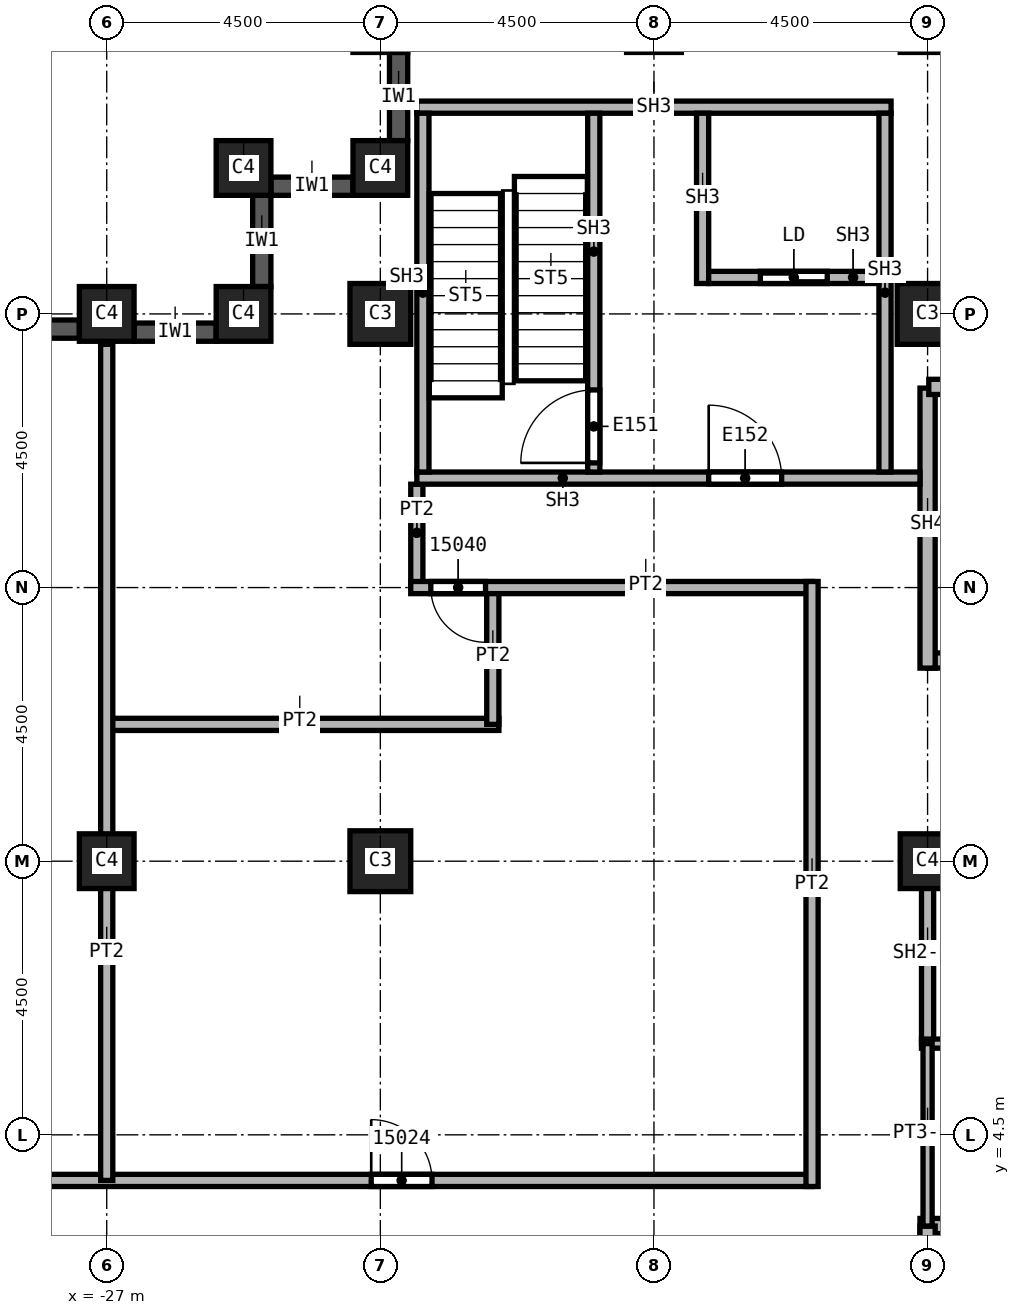
"""IFC4 building model, lengths in metres.
Left out: names, types, materials, properties, quantities, classifications, styles, units other than length and angle.
Written with IfcOpenShell. Run it as: python <this file> out.ifc"""

import sys

from ifc_helpers import new_model, si_unit, direction, frame, frame_2d, origin, origin_2d, place, context, subcontext, project, spatial, rectangle, extrude, element, fill, save


model = new_model("IFC4")
c1 = context("Model", 3, precision=1e-05, world=origin(), true_north=direction((0.0, 1.0)))
c2 = subcontext(c1, "Body", "Model", "MODEL_VIEW")
j1 = project(units=[si_unit("LENGTHUNIT", "METRE"), si_unit("PLANEANGLEUNIT", "RADIAN")], contexts=[c1])
p1 = place(None, origin())
s1 = spatial("IfcSite", under=j1, at=p1, CompositionType="ELEMENT")
p2 = place(p1, origin())
s2 = spatial("IfcBuilding", under=s1, at=p2, CompositionType="ELEMENT")
p3 = place(p2, frame((0.0, 0.0, 232.0)))
s3 = spatial("IfcBuildingStorey", under=s2, at=p3, CompositionType="ELEMENT", Elevation=232.0)
for number, where, z_axis, x_axis in (
    (1, (-13.5, 18.0, 0.0), (0.0, 0.0, 1.0), (1.0, 0.0, 0.0)),
    (2, (-22.5, 9.0, 0.0), (0.0, 0.0, 1.0), (1.0, 0.0, 0.0)),
    (3, (-22.5, 18.0, 0.0), (0.0, 0.0, 1.0), (1.0, 0.0, 0.0)),
):
    element("IfcColumn", number, at=place(p3, frame(where, z_axis=z_axis, x_axis=x_axis)), inside=s3, PredefinedType="COLUMN", context=c2, shape_type="SweptSolid", body=[
        extrude(rectangle(XDim=1.0, YDim=1.0, at=origin_2d()), origin(), (0.0, 0.0, 1.0), 3.6),
    ])
for number, where, z_axis, x_axis in (
    (4, (-13.5, 9.0, 0.0), (0.0, 0.0, 1.0), (1.0, 0.0, 0.0)),
    (5, (-27.0, 9.0, 0.0), (0.0, 0.0, 1.0), (1.0, 0.0, 0.0)),
    (6, (-27.0, 18.0, 0.0), (0.0, 0.0, 1.0), (1.0, 0.0, 0.0)),
    (7, (-22.5, 20.4, 0.0), (0.0, 0.0, 1.0), (1.0, 0.0, 0.0)),
    (8, (-24.75, 20.4, 0.0), (0.0, 0.0, 1.0), (1.0, 0.0, 0.0)),
    (9, (-24.75, 18.0, 0.0), (0.0, 0.0, 1.0), (1.0, 0.0, 0.0)),
):
    element("IfcColumn", number, at=place(p3, frame(where, z_axis=z_axis, x_axis=x_axis)), inside=s3, PredefinedType="COLUMN", context=c2, shape_type="SweptSolid", body=[
        extrude(rectangle(XDim=0.9, YDim=0.9, at=origin_2d()), origin(), (0.0, 0.0, 1.0), 3.6),
    ])
p4 = place(p3, frame((-22.95, 20.1, 0.0), z_axis=(0.0, 0.0, 1.0), x_axis=(-1.0, 0.0, 0.0)))
e10 = element("IfcWall", 10, at=p4, inside=s3, PredefinedType="SOLIDWALL", context=c2, shape_type="SweptSolid", body=[
    extrude(rectangle(XDim=1.35, YDim=0.3, at=frame_2d((0.675, 0.0))), origin(), (0.0, 0.0, 1.0), 3.0),
])
p5 = place(p3, frame((-24.45, 19.95, 0.0), z_axis=(0.0, 0.0, 1.0), x_axis=(0.0, -1.0, 0.0)))
e11 = element("IfcWall", 11, at=p5, inside=s3, PredefinedType="SOLIDWALL", context=c2, shape_type="SweptSolid", body=[
    extrude(rectangle(XDim=1.5, YDim=0.3, at=frame_2d((0.75, 0.0))), origin(), (0.0, 0.0, 1.0), 3.0),
])
p6 = place(p3, frame((-25.2, 17.7, 0.0), z_axis=(0.0, 0.0, 1.0), x_axis=(-1.0, 0.0, 0.0)))
e12 = element("IfcWall", 12, at=p6, inside=s3, PredefinedType="SOLIDWALL", context=c2, shape_type="SweptSolid", body=[
    extrude(rectangle(XDim=1.35, YDim=0.3, at=frame_2d((0.675, 0.0))), origin(), (0.0, 0.0, 1.0), 3.0),
])
p7 = place(p3, frame((-27.45, 17.75, 0.0), z_axis=(0.0, 0.0, 1.0), x_axis=(-1.0, 0.0, 0.0)))
e13 = element("IfcWall", 13, at=p7, inside=s3, PredefinedType="SOLIDWALL", context=c2, shape_type="SweptSolid", body=[
    extrude(rectangle(XDim=3.6, YDim=0.3, at=frame_2d((1.8, 0.0))), origin(), (0.0, 0.0, 1.0), 3.0),
])
p8 = place(p7, frame((0.6, 0.0, 0.8)))
e14 = element("IfcOpeningElement", 14, at=p8, cuts=e13, PredefinedType="OPENING", context=c2, shape_type="SweptSolid", body=[
    extrude(rectangle(XDim=2.4, YDim=1.95, at=frame_2d((1.2, 0.975))), frame((0.0, 0.15, 0.0), z_axis=(0.0, -1.0, 0.0), x_axis=(1.0, 0.0, 0.0)), (0.0, 0.0, 1.0), 0.3),
])
p9 = place(p3, frame((-22.2, 22.3, 0.0), z_axis=(0.0, 0.0, 1.0), x_axis=(0.0, -1.0, 0.0)))
e15 = element("IfcWall", 15, at=p9, inside=s3, PredefinedType="SOLIDWALL", context=c2, shape_type="SweptSolid", body=[
    extrude(rectangle(XDim=1.45, YDim=0.3, at=frame_2d((0.725, 0.0))), origin(), (0.0, 0.0, 1.0), 3.0),
])
p10 = place(p3, frame((-33.85, 3.75, 0.0), z_axis=(0.0, 0.0, 1.0), x_axis=(1.0, 0.0, 0.0)))
e16 = element("IfcWall", 16, at=p10, inside=s3, PredefinedType="PARTITIONING", context=c2, shape_type="SweptSolid", body=[
    extrude(rectangle(XDim=18.45, YDim=0.2, at=frame_2d((9.225, 0.0))), origin(), (0.0, 0.0, 1.0), 3.6),
])
p11 = place(p10, frame((11.2, 0.0, 0.0)))
e17 = element("IfcOpeningElement", 17, at=p11, cuts=e16, PredefinedType="OPENING", context=c2, shape_type="SweptSolid", body=[
    extrude(rectangle(XDim=1.0, YDim=2.1, at=frame_2d((0.5, 1.05))), frame((0.0, 0.1, 0.0), z_axis=(0.0, -1.0, 0.0), x_axis=(1.0, 0.0, 0.0)), (0.0, 0.0, 1.0), 0.2),
])
p12 = place(p3, frame((-27.1, 11.25, 0.0), z_axis=(0.0, 0.0, 1.0), x_axis=(1.0, 0.0, 0.0)))
e18 = element("IfcWall", 18, at=p12, inside=s3, PredefinedType="PARTITIONING", context=c2, shape_type="SweptSolid", body=[
    extrude(rectangle(XDim=6.55, YDim=0.2, at=frame_2d((3.275, 0.0))), origin(), (0.0, 0.0, 1.0), 3.6),
])
p13 = place(p3, frame((-27.0, 3.75, 0.0), z_axis=(0.0, 0.0, 1.0), x_axis=(0.0, 1.0, 0.0)))
e19 = element("IfcWall", 19, at=p13, inside=s3, PredefinedType="PARTITIONING", context=c2, shape_type="SweptSolid", body=[
    extrude(rectangle(XDim=13.75, YDim=0.2, at=frame_2d((6.875, 0.0))), origin(), (0.0, 0.0, 1.0), 3.6),
])
p14 = place(p3, frame((-21.9, 13.5, 0.0), z_axis=(0.0, 0.0, 1.0), x_axis=(0.0, 1.0, 0.0)))
e20 = element("IfcWall", 20, at=p14, inside=s3, PredefinedType="PARTITIONING", context=c2, shape_type="SweptSolid", body=[
    extrude(rectangle(XDim=1.7, YDim=0.2, at=frame_2d((0.85, 0.0))), origin(), (0.0, 0.0, 1.0), 3.6),
])
p15 = place(p3, frame((-20.65, 11.25, 0.0), z_axis=(0.0, 0.0, 1.0), x_axis=(0.0, 1.0, 0.0)))
e21 = element("IfcWall", 21, at=p15, inside=s3, PredefinedType="PARTITIONING", context=c2, shape_type="SweptSolid", body=[
    extrude(rectangle(XDim=2.25, YDim=0.2, at=frame_2d((1.125, 0.0))), origin(), (0.0, 0.0, 1.0), 3.6),
])
p16 = place(p3, frame((-15.4, 13.5, 0.0), z_axis=(0.0, 0.0, 1.0), x_axis=(-1.0, 0.0, 0.0)))
e22 = element("IfcWall", 22, at=p16, inside=s3, PredefinedType="PARTITIONING", context=c2, shape_type="SweptSolid", body=[
    extrude(rectangle(XDim=6.6, YDim=0.2, at=frame_2d((3.3, 0.0))), origin(), (0.0, 0.0, 1.0), 3.6),
])
p17 = place(p16, frame((5.37, 0.0, 0.0)))
e23 = element("IfcOpeningElement", 23, at=p17, cuts=e22, PredefinedType="OPENING", context=c2, shape_type="SweptSolid", body=[
    extrude(rectangle(XDim=0.9, YDim=2.1, at=frame_2d((0.45, 1.05))), frame((0.0, 0.1, 0.0), z_axis=(0.0, -1.0, 0.0), x_axis=(1.0, 0.0, 0.0)), (0.0, 0.0, 1.0), 0.2),
])
p18 = place(p3, frame((-15.4, 3.65, 0.0), z_axis=(0.0, 0.0, 1.0), x_axis=(0.0, 1.0, 0.0)))
e24 = element("IfcWall", 24, at=p18, inside=s3, PredefinedType="PARTITIONING", context=c2, shape_type="SweptSolid", body=[
    extrude(rectangle(XDim=9.95, YDim=0.2, at=frame_2d((4.975, 0.0))), origin(), (0.0, 0.0, 1.0), 3.6),
])
p19 = place(p3, frame((-13.5, 6.0, 0.0), z_axis=(0.0, 0.0, 1.0), x_axis=(0.0, 1.0, 0.0)))
e25 = element("IfcWall", 25, at=p19, inside=s3, PredefinedType="SOLIDWALL", context=c2, shape_type="SweptSolid", body=[
    extrude(rectangle(XDim=3.1, YDim=0.2, at=frame_2d((1.55, 0.0))), origin(), (0.0, 0.0, 1.0), 2.838),
])
p20 = place(p3, frame((-13.5, 9.0, 0.0), z_axis=(0.0, 0.0, 1.0), x_axis=(1.0, 0.0, 0.0)))
e26 = element("IfcWall", 26, at=p20, inside=s3, PredefinedType="SOLIDWALL", context=c2, shape_type="SweptSolid", body=[
    extrude(rectangle(XDim=3.0, YDim=0.2, at=frame_2d((1.5, 0.0))), origin(), (0.0, 0.0, 1.0), 2.838),
])
p21 = place(p3, frame((-13.625, 3.0, 0.0), z_axis=(0.0, 0.0, 1.0), x_axis=(1.0, 0.0, 0.0)))
e27 = element("IfcWall", 27, at=p21, inside=s3, PredefinedType="SOLIDWALL", context=c2, shape_type="SweptSolid", body=[
    extrude(rectangle(XDim=9.25, YDim=0.25, at=frame_2d((4.625, 0.0))), origin(), (0.0, 0.0, 1.0), 3.6),
])
p22 = place(p21, frame((3.25, 0.0, 0.0)))
e28 = element("IfcOpeningElement", 28, at=p22, cuts=e27, PredefinedType="OPENING", context=c2, shape_type="SweptSolid", body=[
    extrude(rectangle(XDim=1.1, YDim=2.1, at=frame_2d((0.55, 1.05))), frame((0.0, 0.125, 0.0), z_axis=(0.0, -1.0, 0.0), x_axis=(1.0, 0.0, 0.0)), (0.0, 0.0, 1.0), 0.25),
])
p23 = place(p3, frame((-13.5, -3.0, 0.0), z_axis=(0.0, 0.0, 1.0), x_axis=(0.0, 1.0, 0.0)))
e29 = element("IfcWall", 29, at=p23, inside=s3, PredefinedType="SOLIDWALL", context=c2, shape_type="SweptSolid", body=[
    extrude(rectangle(XDim=6.0, YDim=0.25, at=frame_2d((3.0, 0.0))), origin(), (0.0, 0.0, 1.0), 2.838),
])
p24 = place(p3, frame((-13.5, 12.3, 0.0), z_axis=(0.0, 0.0, 1.0), x_axis=(1.0, 0.0, 0.0)))
e30 = element("IfcWall", 30, at=p24, inside=s3, PredefinedType="SOLIDWALL", context=c2, shape_type="SweptSolid", body=[
    extrude(rectangle(XDim=9.125, YDim=0.25, at=frame_2d((4.562, 0.0))), origin(), (0.0, 0.0, 1.0), 3.6),
])
p25 = place(p24, frame((0.6, 0.0, 0.0)))
e31 = element("IfcOpeningElement", 31, at=p25, cuts=e30, PredefinedType="OPENING", context=c2, shape_type="SweptSolid", body=[
    extrude(rectangle(XDim=1.2, YDim=2.1, at=frame_2d((0.6, 1.05))), frame((0.0, 0.125, 0.0), z_axis=(0.0, -1.0, 0.0), x_axis=(1.0, 0.0, 0.0)), (0.0, 0.0, 1.0), 0.25),
])
p26 = place(p3, frame((-13.5, 16.78, 0.0), z_axis=(0.0, 0.0, 1.0), x_axis=(0.0, -1.0, 0.0)))
e32 = element("IfcWall", 32, at=p26, inside=s3, PredefinedType="SOLIDWALL", context=c2, shape_type="SweptSolid", body=[
    extrude(rectangle(XDim=4.605, YDim=0.25, at=frame_2d((2.302, 0.0))), origin(), (0.0, 0.0, 1.0), 3.6),
])
p27 = place(p3, frame((-13.48, 16.8, 0.0), z_axis=(0.0, 0.0, 1.0), x_axis=(1.0, 0.0, 0.0)))
e33 = element("IfcWall", 33, at=p27, inside=s3, PredefinedType="SOLIDWALL", context=c2, shape_type="SweptSolid", body=[
    extrude(rectangle(XDim=8.96, YDim=0.25, at=frame_2d((4.48, 0.0))), origin(), (0.0, 0.0, 1.0), 3.6),
])
p28 = place(p3, frame((-13.6, 6.0, 0.0), z_axis=(0.0, 0.0, 1.0), x_axis=(1.0, 0.0, 0.0)))
e34 = element("IfcWall", 34, at=p28, inside=s3, PredefinedType="PARTITIONING", context=c2, shape_type="SweptSolid", body=[
    extrude(rectangle(XDim=3.1, YDim=0.15, at=frame_2d((1.55, 0.0))), origin(), (0.0, 0.0, 1.0), 3.6),
])
p29 = place(p3, frame((-13.5, 3.0, 0.0), z_axis=(0.0, 0.0, 1.0), x_axis=(0.0, 1.0, 0.0)))
e35 = element("IfcWall", 35, at=p29, inside=s3, PredefinedType="PARTITIONING", context=c2, shape_type="SweptSolid", body=[
    extrude(rectangle(XDim=3.0, YDim=0.15, at=frame_2d((1.5, 0.0))), origin(), (0.0, 0.0, 1.0), 2.838),
])
p30 = place(p3, frame((-21.9, 15.3, 0.0), z_axis=(0.0, 0.0, 1.0), x_axis=(1.0, 0.0, 0.0)))
e36 = element("IfcWall", 36, at=p30, inside=s3, PredefinedType="SOLIDWALL", context=c2, shape_type="SweptSolid", body=[
    extrude(rectangle(XDim=8.275, YDim=0.2, at=frame_2d((4.137, 0.0))), origin(), (0.0, 0.0, 1.0), 3.6),
])
p31 = place(p30, frame((4.8, 0.0, 0.0)))
e37 = element("IfcOpeningElement", 37, at=p31, cuts=e36, PredefinedType="OPENING", context=c2, shape_type="SweptSolid", body=[
    extrude(rectangle(XDim=1.2, YDim=2.1, at=frame_2d((0.6, 1.05))), frame((0.0, 0.1, 0.0), z_axis=(0.0, -1.0, 0.0), x_axis=(1.0, 0.0, 0.0)), (0.0, 0.0, 1.0), 0.2),
])
p32 = place(p3, frame((-21.9, 21.4, 0.0), z_axis=(0.0, 0.0, 1.0), x_axis=(1.0, 0.0, 0.0)))
e38 = element("IfcWall", 38, at=p32, inside=s3, PredefinedType="SOLIDWALL", context=c2, shape_type="SweptSolid", body=[
    extrude(rectangle(XDim=7.8, YDim=0.2, at=frame_2d((3.9, 0.0))), origin(), (0.0, 0.0, 1.0), 3.6),
])
for number, where, z_axis, x_axis in (
    (39, (-21.8, 15.4, 0.0), (0.0, 0.0, 1.0), (0.0, 1.0, 0.0)),
    (40, (-14.2, 15.4, 0.0), (0.0, 0.0, 1.0), (0.0, 1.0, 0.0)),
):
    element("IfcWall", number, at=place(p3, frame(where, z_axis=z_axis, x_axis=x_axis)), inside=s3, PredefinedType="SOLIDWALL", context=c2, shape_type="SweptSolid", body=[
        extrude(rectangle(XDim=5.9, YDim=0.2, at=frame_2d((2.95, 0.0))), origin(), (0.0, 0.0, 1.0), 3.6),
    ])
p33 = place(p3, frame((-18.99, 15.4, 0.0), z_axis=(0.0, 0.0, 1.0), x_axis=(0.0, 1.0, 0.0)))
e41 = element("IfcWall", 41, at=p33, inside=s3, PredefinedType="SOLIDWALL", context=c2, shape_type="SweptSolid", body=[
    extrude(rectangle(XDim=5.9, YDim=0.2, at=frame_2d((2.95, 0.0))), origin(), (0.0, 0.0, 1.0), 3.6),
])
p34 = place(p33, frame((0.15, 0.0, 0.0)))
e42 = element("IfcOpeningElement", 42, at=p34, cuts=e41, PredefinedType="OPENING", context=c2, shape_type="SweptSolid", body=[
    extrude(rectangle(XDim=1.2, YDim=2.1, at=frame_2d((0.6, 1.05))), frame((0.0, 0.1, 0.0), z_axis=(0.0, -1.0, 0.0), x_axis=(1.0, 0.0, 0.0)), (0.0, 0.0, 1.0), 0.2),
])
p35 = place(p3, frame((-17.2, 18.5, 0.0), z_axis=(0.0, 0.0, 1.0), x_axis=(0.0, 1.0, 0.0)))
e43 = element("IfcWall", 43, at=p35, inside=s3, PredefinedType="SOLIDWALL", context=c2, shape_type="SweptSolid", body=[
    extrude(rectangle(XDim=2.8, YDim=0.2, at=frame_2d((1.4, 0.0))), origin(), (0.0, 0.0, 1.0), 3.6),
])
p36 = place(p3, frame((-17.1, 18.6, 0.0), z_axis=(0.0, 0.0, 1.0), x_axis=(1.0, 0.0, 0.0)))
e44 = element("IfcWall", 44, at=p36, inside=s3, PredefinedType="SOLIDWALL", context=c2, shape_type="SweptSolid", body=[
    extrude(rectangle(XDim=2.8, YDim=0.2, at=frame_2d((1.4, 0.0))), origin(), (0.0, 0.0, 1.0), 3.6),
])
p37 = place(p36, frame((0.85, 0.0, 0.0)))
e45 = element("IfcOpeningElement", 45, at=p37, cuts=e44, PredefinedType="OPENING", context=c2, shape_type="SweptSolid", body=[
    extrude(rectangle(XDim=1.1, YDim=2.1, at=frame_2d((0.55, 1.05))), frame((0.0, 0.1, 0.0), z_axis=(0.0, -1.0, 0.0), x_axis=(1.0, 0.0, 0.0)), (0.0, 0.0, 1.0), 0.2),
])
p38 = place(p11, origin())
e46 = element("IfcDoor", 46, at=p38, inside=s3, OperationType="SINGLE_SWING_LEFT", PredefinedType="DOOR", context=c2, shape_type="SweptSolid", body=[
    extrude(rectangle(XDim=1.0, YDim=2.1, at=frame_2d((0.5, 1.05))), frame((0.0, 0.025, 0.0), z_axis=(0.0, -1.0, 0.0), x_axis=(1.0, 0.0, 0.0)), (0.0, 0.0, 1.0), 0.05),
])
fill(e17, e46)
p39 = place(p17, origin())
e47 = element("IfcDoor", 47, at=p39, inside=s3, OperationType="SINGLE_SWING_LEFT", PredefinedType="DOOR", context=c2, shape_type="SweptSolid", body=[
    extrude(rectangle(XDim=0.9, YDim=2.1, at=frame_2d((0.45, 1.05))), frame((0.0, 0.025, 0.0), z_axis=(0.0, -1.0, 0.0), x_axis=(1.0, 0.0, 0.0)), (0.0, 0.0, 1.0), 0.05),
])
fill(e23, e47)
p40 = place(p34, origin())
e48 = element("IfcDoor", 48, at=p40, inside=s3, OperationType="SINGLE_SWING_LEFT", PredefinedType="DOOR", context=c2, shape_type="SweptSolid", body=[
    extrude(rectangle(XDim=1.2, YDim=2.1, at=frame_2d((0.6, 1.05))), frame((0.0, 0.025, 0.0), z_axis=(0.0, -1.0, 0.0), x_axis=(1.0, 0.0, 0.0)), (0.0, 0.0, 1.0), 0.05),
])
fill(e42, e48)
p41 = place(p37, origin())
e49 = element("IfcDoor", 49, at=p41, inside=s3, OperationType="SLIDING_TO_LEFT", PredefinedType="DOOR", context=c2, shape_type="SweptSolid", body=[
    extrude(rectangle(XDim=1.1, YDim=2.1, at=frame_2d((0.55, 1.05))), frame((0.0, 0.025, 0.0), z_axis=(0.0, -1.0, 0.0), x_axis=(1.0, 0.0, 0.0)), (0.0, 0.0, 1.0), 0.05),
])
fill(e45, e49)
p42 = place(p31, origin())
e50 = element("IfcDoor", 50, at=p42, inside=s3, OperationType="SINGLE_SWING_RIGHT", PredefinedType="DOOR", context=c2, shape_type="SweptSolid", body=[
    extrude(rectangle(XDim=1.2, YDim=2.1, at=frame_2d((0.6, 1.05))), frame((0.0, 0.025, 0.0), z_axis=(0.0, -1.0, 0.0), x_axis=(1.0, 0.0, 0.0)), (0.0, 0.0, 1.0), 0.05),
])
fill(e37, e50)
save(model, sys.argv[1])
